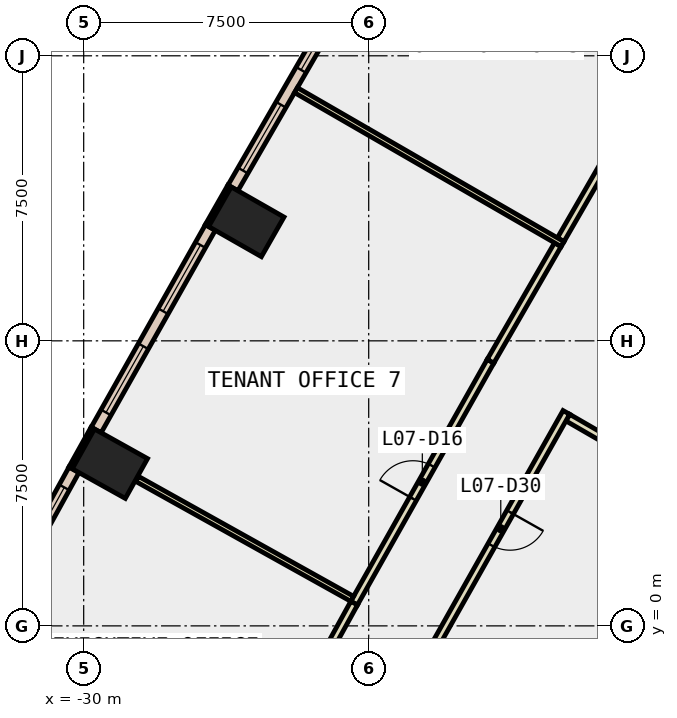
"""IFC4 building model, lengths in metres.
Left out: names, types, materials, properties, quantities, classifications, styles, units other than length and angle.
Written with IfcOpenShell. Run it as: python <this file> out.ifc"""

import sys

from ifc_helpers import new_model, si_unit, direction, frame, frame_2d, origin, origin_2d, place, context, subcontext, project, spatial, rectangle, extrude, element, fill, save


model = new_model("IFC4")
c1 = context("Model", 3, precision=1e-05, world=origin(), true_north=direction((0.0, 1.0)))
c2 = subcontext(c1, "Body", "Model", "MODEL_VIEW")
j1 = project(units=[si_unit("LENGTHUNIT", "METRE"), si_unit("PLANEANGLEUNIT", "RADIAN")], contexts=[c1])
p1 = place(None, origin())
s1 = spatial("IfcSite", under=j1, at=p1, CompositionType="ELEMENT")
p2 = place(p1, origin())
s2 = spatial("IfcBuilding", under=s1, at=p2, CompositionType="ELEMENT")
p3 = place(p2, frame((0.0, 0.0, 39.2)))
s3 = spatial("IfcBuildingStorey", under=s2, at=p3, CompositionType="ELEMENT", Elevation=39.2)
for number, where, z_axis, x_axis in (
    (1, (-25.721, 10.632, -0.4), (0.0, 0.0, 1.0), (0.496, 0.869, 0.0)),
    (2, (-29.311, 4.267, -0.4), (0.0, 0.0, 1.0), (0.487, 0.873, 0.0)),
):
    element("IfcColumn", number, at=place(p3, frame(where, z_axis=z_axis, x_axis=x_axis)), inside=s3, PredefinedType="COLUMN", context=c2, shape_type="SweptSolid", body=[
        extrude(rectangle(XDim=1.2, YDim=1.6, at=origin_2d()), origin(), (0.0, 0.0, 1.0), 4.2),
    ])
p4 = place(p3, frame((-26.162, 11.574, 0.0), z_axis=(0.0, 0.0, 1.0), x_axis=(-0.495854054996, -0.868405870629, 0.0)))
e3 = element("IfcWall", 3, at=p4, inside=s3, PredefinedType="STANDARD", context=c2, shape_type="SweptSolid", body=[
    extrude(rectangle(XDim=1.2, YDim=0.1, at=frame_2d((0.6, 0.0))), origin(), (0.0, 0.0, 1.0), 3.8),
])
p5 = place(p3, frame((-29.761, 5.205, 0.0), z_axis=(0.0, 0.0, 1.0), x_axis=(-0.486730996044, -0.87355190887, 0.0)))
e4 = element("IfcWall", 4, at=p5, inside=s3, PredefinedType="STANDARD", context=c2, shape_type="SweptSolid", body=[
    extrude(rectangle(XDim=1.2, YDim=0.1, at=frame_2d((0.6, 0.0))), origin(), (0.0, 0.0, 1.0), 3.8),
])
p6 = place(p3, frame((-23.015, 16.819, 0.0), z_axis=(0.0, 0.0, 1.0), x_axis=(-0.499976985038, -0.866038691071, 0.0)))
e5 = element("IfcWall", 5, at=p6, inside=s3, PredefinedType="STANDARD", context=c2, shape_type="SweptSolid", body=[
    extrude(rectangle(XDim=6.116, YDim=0.3, at=frame_2d((3.058, 0.0))), origin(), (0.0, 0.0, 1.0), 3.8),
])
p7 = place(p6, frame((0.529, 0.0, 0.9)))
e6 = element("IfcOpeningElement", 6, at=p7, cuts=e5, PredefinedType="OPENING", context=c2, shape_type="SweptSolid", body=[
    extrude(rectangle(XDim=2.0, YDim=2.6, at=frame_2d((1.0, 1.3))), frame((0.0, 0.16, 0.0), z_axis=(0.0, -1.0, 0.0), x_axis=(1.0, 0.0, 0.0)), (0.0, 0.0, 1.0), 0.32),
])
p8 = place(p6, frame((3.587, 0.0, 0.9)))
e7 = element("IfcOpeningElement", 7, at=p8, cuts=e5, PredefinedType="OPENING", context=c2, shape_type="SweptSolid", body=[
    extrude(rectangle(XDim=2.0, YDim=2.6, at=frame_2d((1.0, 1.3))), frame((0.0, 0.16, 0.0), z_axis=(0.0, -1.0, 0.0), x_axis=(1.0, 0.0, 0.0)), (0.0, 0.0, 1.0), 0.32),
])
p9 = place(p3, frame((-26.667, 10.482, 0.0), z_axis=(0.0, 0.0, 1.0), x_axis=(-0.491278487323, -0.871002553322, 0.0)))
e8 = element("IfcWall", 8, at=p9, inside=s3, PredefinedType="STANDARD", context=c2, shape_type="SweptSolid", body=[
    extrude(rectangle(XDim=6.117, YDim=0.3, at=frame_2d((3.059, 0.0))), origin(), (0.0, 0.0, 1.0), 3.8),
])
p10 = place(p9, frame((0.529, 0.0, 0.9)))
e9 = element("IfcOpeningElement", 9, at=p10, cuts=e8, PredefinedType="OPENING", context=c2, shape_type="SweptSolid", body=[
    extrude(rectangle(XDim=2.0, YDim=2.6, at=frame_2d((1.0, 1.3))), frame((0.0, 0.16, 0.0), z_axis=(0.0, -1.0, 0.0), x_axis=(1.0, 0.0, 0.0)), (0.0, 0.0, 1.0), 0.32),
])
p11 = place(p9, frame((3.588, 0.0, 0.9)))
e10 = element("IfcOpeningElement", 10, at=p11, cuts=e8, PredefinedType="OPENING", context=c2, shape_type="SweptSolid", body=[
    extrude(rectangle(XDim=2.0, YDim=2.6, at=frame_2d((1.0, 1.3))), frame((0.0, 0.16, 0.0), z_axis=(0.0, -1.0, 0.0), x_axis=(1.0, 0.0, 0.0)), (0.0, 0.0, 1.0), 0.32),
])
p12 = place(p3, frame((-30.255, 4.107, 0.0), z_axis=(0.0, 0.0, 1.0), x_axis=(-0.482596003603, -0.875843078015, 0.0)))
e11 = element("IfcWall", 11, at=p12, inside=s3, PredefinedType="STANDARD", context=c2, shape_type="SweptSolid", body=[
    extrude(rectangle(XDim=6.115, YDim=0.3, at=frame_2d((3.058, 0.0))), origin(), (0.0, 0.0, 1.0), 3.8),
])
p13 = place(p12, frame((0.529, 0.0, 0.9)))
e12 = element("IfcOpeningElement", 12, at=p13, cuts=e11, PredefinedType="OPENING", context=c2, shape_type="SweptSolid", body=[
    extrude(rectangle(XDim=2.0, YDim=2.6, at=frame_2d((1.0, 1.3))), frame((0.0, 0.16, 0.0), z_axis=(0.0, -1.0, 0.0), x_axis=(1.0, 0.0, 0.0)), (0.0, 0.0, 1.0), 0.32),
])
p14 = place(p12, frame((3.586, 0.0, 0.9)))
e13 = element("IfcOpeningElement", 13, at=p14, cuts=e11, PredefinedType="OPENING", context=c2, shape_type="SweptSolid", body=[
    extrude(rectangle(XDim=2.0, YDim=2.6, at=frame_2d((1.0, 1.3))), frame((0.0, 0.16, 0.0), z_axis=(0.0, -1.0, 0.0), x_axis=(1.0, 0.0, 0.0)), (0.0, 0.0, 1.0), 0.32),
])
p15 = place(p3, frame((-17.261, 5.48, 0.0), z_axis=(0.0, 0.0, 1.0), x_axis=(0.865949187497, -0.500131987253, 0.0)))
e14 = element("IfcWall", 14, at=p15, inside=s3, PredefinedType="PARTITIONING", context=c2, shape_type="SweptSolid", body=[
    extrude(rectangle(XDim=3.939, YDim=0.2, at=frame_2d((1.969, 0.0))), origin(), (0.0, 0.0, 1.0), 3.8),
])
p16 = place(p3, frame((-17.299, 5.617, 0.0), z_axis=(0.0, 0.0, 1.0), x_axis=(-0.491166441632, -0.871065741844, 0.0)))
e15 = element("IfcWall", 15, at=p16, inside=s3, PredefinedType="PARTITIONING", context=c2, shape_type="SweptSolid", body=[
    extrude(rectangle(XDim=7.028, YDim=0.2, at=frame_2d((3.514, 0.0))), origin(), (0.0, 0.0, 1.0), 3.8),
])
p17 = place(p16, frame((3.014, 0.0, 0.0)))
e16 = element("IfcOpeningElement", 16, at=p17, cuts=e15, PredefinedType="OPENING", context=c2, shape_type="SweptSolid", body=[
    extrude(rectangle(XDim=1.0, YDim=2.1, at=frame_2d((0.5, 1.05))), frame((0.0, 0.11, 0.0), z_axis=(0.0, -1.0, 0.0), x_axis=(1.0, 0.0, 0.0)), (0.0, 0.0, 1.0), 0.22),
])
p18 = place(p3, frame((-17.448, 10.16, 0.0), z_axis=(0.0, 0.0, 1.0), x_axis=(0.499951278228, 0.866053531485, 0.0)))
e17 = element("IfcWall", 17, at=p18, inside=s3, PredefinedType="PARTITIONING", context=c2, shape_type="SweptSolid", body=[
    extrude(rectangle(XDim=3.54, YDim=0.2, at=frame_2d((1.77, 0.0))), origin(), (0.0, 0.0, 1.0), 3.8),
])
p19 = place(p3, frame((-22.884, 0.598, 0.0), z_axis=(0.0, 0.0, 1.0), x_axis=(0.491206176175, 0.871043335597, 0.0)))
e18 = element("IfcWall", 18, at=p19, inside=s3, PredefinedType="PARTITIONING", context=c2, shape_type="SweptSolid", body=[
    extrude(rectangle(XDim=7.309, YDim=0.2, at=frame_2d((3.654, 0.0))), origin(), (0.0, 0.0, 1.0), 3.8),
])
p20 = place(p19, frame((3.154, 0.0, 0.0)))
e19 = element("IfcOpeningElement", 19, at=p20, cuts=e18, PredefinedType="OPENING", context=c2, shape_type="SweptSolid", body=[
    extrude(rectangle(XDim=1.0, YDim=2.1, at=frame_2d((0.5, 1.05))), frame((0.0, 0.11, 0.0), z_axis=(0.0, -1.0, 0.0), x_axis=(1.0, 0.0, 0.0)), (0.0, 0.0, 1.0), 0.22),
])
p21 = place(p3, frame((-19.294, 6.964, 0.0), z_axis=(0.0, 0.0, 1.0), x_axis=(0.499861717316, 0.86610522661, 0.0)))
e20 = element("IfcWall", 20, at=p21, inside=s3, PredefinedType="PARTITIONING", context=c2, shape_type="SweptSolid", body=[
    extrude(rectangle(XDim=3.541, YDim=0.2, at=frame_2d((1.771, 0.0))), origin(), (0.0, 0.0, 1.0), 3.8),
])
p22 = place(p3, frame((-26.373, -5.736, 0.0), z_axis=(0.0, 0.0, 1.0), x_axis=(0.482587313112, 0.875847866483, 0.0)))
e21 = element("IfcWall", 21, at=p22, inside=s3, PredefinedType="PARTITIONING", context=c2, shape_type="SweptSolid", body=[
    extrude(rectangle(XDim=7.232, YDim=0.2, at=frame_2d((3.616, 0.0))), origin(), (0.0, 0.0, 1.0), 3.8),
])
p23 = place(p22, frame((3.191, 0.0, 0.0)))
e22 = element("IfcOpeningElement", 22, at=p23, cuts=e21, PredefinedType="OPENING", context=c2, shape_type="SweptSolid", body=[
    extrude(rectangle(XDim=1.0, YDim=2.1, at=frame_2d((0.5, 1.05))), frame((0.0, 0.11, 0.0), z_axis=(0.0, -1.0, 0.0), x_axis=(1.0, 0.0, 0.0)), (0.0, 0.0, 1.0), 0.22),
])
p24 = place(p3, frame((-17.399, 10.045, 0.0), z_axis=(0.0, 0.0, 1.0), x_axis=(-0.865980803489, 0.500077242023, 0.0)))
e23 = element("IfcWall", 23, at=p24, inside=s3, PredefinedType="PARTITIONING", context=c2, shape_type="SweptSolid", body=[
    extrude(rectangle(XDim=8.101, YDim=0.15, at=frame_2d((4.05, 0.0))), origin(), (0.0, 0.0, 1.0), 3.8),
])
p25 = place(p3, frame((-22.935, 0.712, 0.0), z_axis=(0.0, 0.0, 1.0), x_axis=(-0.873395616379, 0.487011393389, 0.0)))
e24 = element("IfcWall", 24, at=p25, inside=s3, PredefinedType="PARTITIONING", context=c2, shape_type="SweptSolid", body=[
    extrude(rectangle(XDim=6.48, YDim=0.15, at=frame_2d((3.24, 0.0))), origin(), (0.0, 0.0, 1.0), 3.8),
])
p26 = place(p7, origin())
e25 = element("IfcWindow", 25, at=p26, inside=s3, PartitioningType="SINGLE_PANEL", PredefinedType="WINDOW", context=c2, shape_type="SweptSolid", body=[
    extrude(rectangle(XDim=2.0, YDim=2.6, at=frame_2d((1.0, 1.3))), frame((0.0, 0.03, 0.0), z_axis=(0.0, -1.0, 0.0), x_axis=(1.0, 0.0, 0.0)), (0.0, 0.0, 1.0), 0.06),
])
fill(e6, e25)
p27 = place(p8, origin())
e26 = element("IfcWindow", 26, at=p27, inside=s3, PartitioningType="SINGLE_PANEL", PredefinedType="WINDOW", context=c2, shape_type="SweptSolid", body=[
    extrude(rectangle(XDim=2.0, YDim=2.6, at=frame_2d((1.0, 1.3))), frame((0.0, 0.03, 0.0), z_axis=(0.0, -1.0, 0.0), x_axis=(1.0, 0.0, 0.0)), (0.0, 0.0, 1.0), 0.06),
])
fill(e7, e26)
p28 = place(p10, origin())
e27 = element("IfcWindow", 27, at=p28, inside=s3, PartitioningType="SINGLE_PANEL", PredefinedType="WINDOW", context=c2, shape_type="SweptSolid", body=[
    extrude(rectangle(XDim=2.0, YDim=2.6, at=frame_2d((1.0, 1.3))), frame((0.0, 0.03, 0.0), z_axis=(0.0, -1.0, 0.0), x_axis=(1.0, 0.0, 0.0)), (0.0, 0.0, 1.0), 0.06),
])
fill(e9, e27)
p29 = place(p11, origin())
e28 = element("IfcWindow", 28, at=p29, inside=s3, PartitioningType="SINGLE_PANEL", PredefinedType="WINDOW", context=c2, shape_type="SweptSolid", body=[
    extrude(rectangle(XDim=2.0, YDim=2.6, at=frame_2d((1.0, 1.3))), frame((0.0, 0.03, 0.0), z_axis=(0.0, -1.0, 0.0), x_axis=(1.0, 0.0, 0.0)), (0.0, 0.0, 1.0), 0.06),
])
fill(e10, e28)
p30 = place(p13, origin())
e29 = element("IfcWindow", 29, at=p30, inside=s3, PartitioningType="SINGLE_PANEL", PredefinedType="WINDOW", context=c2, shape_type="SweptSolid", body=[
    extrude(rectangle(XDim=2.0, YDim=2.6, at=frame_2d((1.0, 1.3))), frame((0.0, 0.03, 0.0), z_axis=(0.0, -1.0, 0.0), x_axis=(1.0, 0.0, 0.0)), (0.0, 0.0, 1.0), 0.06),
])
fill(e12, e29)
p31 = place(p20, origin())
e30 = element("IfcDoor", 30, at=p31, inside=s3, OperationType="SINGLE_SWING_RIGHT", PredefinedType="DOOR", context=c2, shape_type="SweptSolid", body=[
    extrude(rectangle(XDim=1.0, YDim=2.1, at=frame_2d((0.5, 1.05))), frame((0.0, 0.025, 0.0), z_axis=(0.0, -1.0, 0.0), x_axis=(1.0, 0.0, 0.0)), (0.0, 0.0, 1.0), 0.05),
])
fill(e19, e30)
p32 = place(p17, origin())
e31 = element("IfcDoor", 31, at=p32, inside=s3, OperationType="SINGLE_SWING_RIGHT", PredefinedType="DOOR", context=c2, shape_type="SweptSolid", body=[
    extrude(rectangle(XDim=1.0, YDim=2.1, at=frame_2d((0.5, 1.05))), frame((0.0, 0.025, 0.0), z_axis=(0.0, -1.0, 0.0), x_axis=(1.0, 0.0, 0.0)), (0.0, 0.0, 1.0), 0.05),
])
fill(e16, e31)
save(model, sys.argv[1])
